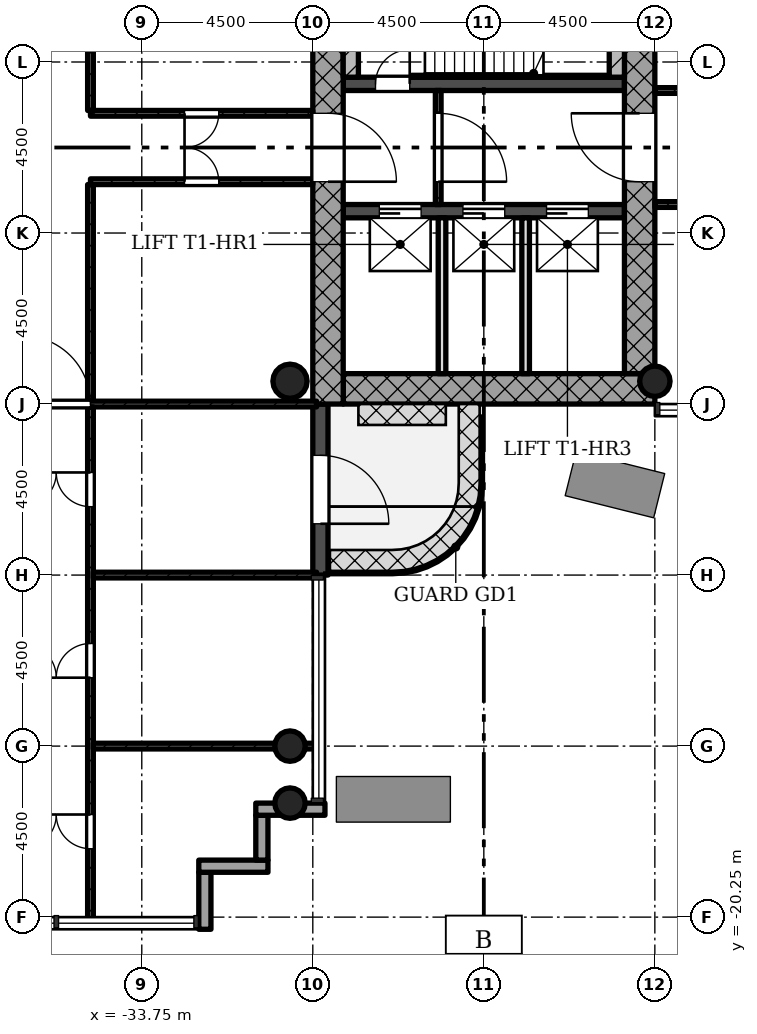
"""IFC4 building model, lengths in metres.
Left out: names, types, materials, properties, quantities, classifications, styles, units other than length and angle.
Written with IfcOpenShell. Run it as: python <this file> out.ifc"""

import sys

from ifc_helpers import new_model, si_unit, direction, frame, frame_2d, origin, origin_2d, place, context, subcontext, project, spatial, rectangle, hollow_circle, extrude, element, fill, save


model = new_model("IFC4")
c1 = context("Model", 3, precision=1e-05, world=origin(), true_north=direction((0.0, 1.0)))
c2 = subcontext(c1, "Body", "Model", "MODEL_VIEW")
j1 = project(units=[si_unit("LENGTHUNIT", "METRE"), si_unit("PLANEANGLEUNIT", "RADIAN")], contexts=[c1])
p1 = place(None, origin())
s1 = spatial("IfcSite", under=j1, at=p1, CompositionType="ELEMENT")
p2 = place(p1, origin())
s2 = spatial("IfcBuilding", under=s1, at=p2, CompositionType="ELEMENT")
p3 = place(p2, frame((0.0, 0.0, 181.3)))
s3 = spatial("IfcBuildingStorey", under=s2, at=p3, CompositionType="ELEMENT", Elevation=181.3)
p4 = place(p3, frame((-28.45, -6.35, 0.0), z_axis=(0.0, 0.0, 1.0), x_axis=(1.0, 0.0, 0.0)))
e1 = element("IfcWall", 1, at=p4, inside=s3, PredefinedType="SHEAR", context=c2, shape_type="SweptSolid", body=[
    extrude(rectangle(XDim=8.2, YDim=0.8, at=frame_2d((4.1, 0.0))), origin(), (0.0, 0.0, 1.0), 4.5),
])
p5 = place(p3, frame((-20.65, -5.95, 0.0), z_axis=(0.0, 0.0, 1.0), x_axis=(0.0, 1.0, 0.0)))
e2 = element("IfcWall", 2, at=p5, inside=s3, PredefinedType="SHEAR", context=c2, shape_type="SweptSolid", body=[
    extrude(rectangle(XDim=12.7, YDim=0.8, at=frame_2d((6.35, 0.0))), origin(), (0.0, 0.0, 1.0), 4.5),
])
p6 = place(p5, frame((5.05, 0.0, 0.0)))
e3 = element("IfcOpeningElement", 3, at=p6, cuts=e2, PredefinedType="OPENING", context=c2, shape_type="SweptSolid", body=[
    extrude(rectangle(XDim=1.8, YDim=2.1, at=frame_2d((0.9, 1.05))), frame((0.0, 0.41, 0.0), z_axis=(0.0, -1.0, 0.0), x_axis=(1.0, 0.0, 0.0)), (0.0, 0.0, 1.0), 0.82),
])
p7 = place(p3, frame((-28.85, 5.95, 0.0), z_axis=(0.0, 0.0, 1.0), x_axis=(0.0, -1.0, 0.0)))
e4 = element("IfcWall", 4, at=p7, inside=s3, PredefinedType="SHEAR", context=c2, shape_type="SweptSolid", body=[
    extrude(rectangle(XDim=12.7, YDim=0.8, at=frame_2d((6.35, 0.0))), origin(), (0.0, 0.0, 1.0), 4.5),
])
p8 = place(p7, frame((5.05, 0.0, 0.0)))
e5 = element("IfcOpeningElement", 5, at=p8, cuts=e4, PredefinedType="OPENING", context=c2, shape_type="SweptSolid", body=[
    extrude(rectangle(XDim=1.8, YDim=2.1, at=frame_2d((0.9, 1.05))), frame((0.0, 0.41, 0.0), z_axis=(0.0, -1.0, 0.0), x_axis=(1.0, 0.0, 0.0)), (0.0, 0.0, 1.0), 0.82),
])
p9 = place(p3, frame((-28.45, -1.675, 0.0), z_axis=(0.0, 0.0, 1.0), x_axis=(1.0, 0.0, 0.0)))
e6 = element("IfcWall", 6, at=p9, inside=s3, PredefinedType="SHEAR", context=c2, shape_type="SweptSolid", body=[
    extrude(rectangle(XDim=7.4, YDim=0.35, at=frame_2d((3.7, 0.0))), origin(), (0.0, 0.0, 1.0), 4.5),
])
p10 = place(p9, frame((0.95, 0.0, 0.0)))
e7 = element("IfcOpeningElement", 7, at=p10, cuts=e6, PredefinedType="OPENING", context=c2, shape_type="SweptSolid", body=[
    extrude(rectangle(XDim=1.1, YDim=2.1, at=frame_2d((0.55, 1.05))), frame((0.0, 0.185, 0.0), z_axis=(0.0, -1.0, 0.0), x_axis=(1.0, 0.0, 0.0)), (0.0, 0.0, 1.0), 0.37),
])
p11 = place(p9, frame((3.15, 0.0, 0.0)))
e8 = element("IfcOpeningElement", 8, at=p11, cuts=e6, PredefinedType="OPENING", context=c2, shape_type="SweptSolid", body=[
    extrude(rectangle(XDim=1.1, YDim=2.1, at=frame_2d((0.55, 1.05))), frame((0.0, 0.185, 0.0), z_axis=(0.0, -1.0, 0.0), x_axis=(1.0, 0.0, 0.0)), (0.0, 0.0, 1.0), 0.37),
])
p12 = place(p9, frame((5.35, 0.0, 0.0)))
e9 = element("IfcOpeningElement", 9, at=p12, cuts=e6, PredefinedType="OPENING", context=c2, shape_type="SweptSolid", body=[
    extrude(rectangle(XDim=1.1, YDim=2.1, at=frame_2d((0.55, 1.05))), frame((0.0, 0.185, 0.0), z_axis=(0.0, -1.0, 0.0), x_axis=(1.0, 0.0, 0.0)), (0.0, 0.0, 1.0), 0.37),
])
p13 = place(p3, frame((-28.45, 1.675, 0.0), z_axis=(0.0, 0.0, 1.0), x_axis=(1.0, 0.0, 0.0)))
e10 = element("IfcWall", 10, at=p13, inside=s3, PredefinedType="SHEAR", context=c2, shape_type="SweptSolid", body=[
    extrude(rectangle(XDim=7.4, YDim=0.35, at=frame_2d((3.7, 0.0))), origin(), (0.0, 0.0, 1.0), 4.5),
])
p14 = place(p13, frame((0.85, 0.0, 0.0)))
e11 = element("IfcOpeningElement", 11, at=p14, cuts=e10, PredefinedType="OPENING", context=c2, shape_type="SweptSolid", body=[
    extrude(rectangle(XDim=0.9, YDim=2.1, at=frame_2d((0.45, 1.05))), frame((0.0, 0.185, 0.0), z_axis=(0.0, -1.0, 0.0), x_axis=(1.0, 0.0, 0.0)), (0.0, 0.0, 1.0), 0.37),
])
for number, where, z_axis, x_axis in (
    (12, (-20.25, -6.15, 0.0), (0.0, 0.0, 1.0), (1.0, 0.0, 0.0)),
    (13, (-29.85, -15.75, 0.0), (0.0, 0.0, 1.0), (1.0, 0.0, 0.0)),
    (14, (-29.85, -17.25, 0.0), (0.0, 0.0, 1.0), (1.0, 0.0, 0.0)),
):
    element("IfcColumn", number, at=place(p3, frame(where, z_axis=z_axis, x_axis=x_axis)), inside=s3, PredefinedType="COLUMN", context=c2, shape_type="SweptSolid", body=[
        extrude(hollow_circle(Radius=0.4, WallThickness=0.028, at=origin_2d()), origin(), (0.0, 0.0, 1.0), 4.5),
    ])
p15 = place(p3, frame((-29.85, -6.15, 0.0), z_axis=(0.0, 0.0, 1.0), x_axis=(1.0, 0.0, 0.0)))
e15 = element("IfcColumn", 15, at=p15, inside=s3, PredefinedType="COLUMN", context=c2, shape_type="SweptSolid", body=[
    extrude(hollow_circle(Radius=0.45, WallThickness=0.032, at=origin_2d()), origin(), (0.0, 0.0, 1.0), 4.5),
])
p16 = place(p3, frame((-32.09, -20.57, -0.3), z_axis=(0.0, 0.0, 1.0), x_axis=(0.0, 1.0, 0.0)))
e16 = element("IfcWall", 16, at=p16, inside=s3, PredefinedType="STANDARD", context=c2, shape_type="SweptSolid", body=[
    extrude(rectangle(XDim=1.5, YDim=0.32, at=frame_2d((0.75, 0.0))), origin(), (0.0, 0.0, 1.0), 4.5),
])
p17 = place(p3, frame((-32.25, -18.91, -0.3), z_axis=(0.0, 0.0, 1.0), x_axis=(1.0, 0.0, 0.0)))
e17 = element("IfcWall", 17, at=p17, inside=s3, PredefinedType="STANDARD", context=c2, shape_type="SweptSolid", body=[
    extrude(rectangle(XDim=1.82, YDim=0.32, at=frame_2d((0.91, 0.0))), origin(), (0.0, 0.0, 1.0), 4.5),
])
p18 = place(p3, frame((-30.59, -18.75, -0.3), z_axis=(0.0, 0.0, 1.0), x_axis=(0.0, 1.0, 0.0)))
e18 = element("IfcWall", 18, at=p18, inside=s3, PredefinedType="STANDARD", context=c2, shape_type="SweptSolid", body=[
    extrude(rectangle(XDim=1.18, YDim=0.32, at=frame_2d((0.59, 0.0))), origin(), (0.0, 0.0, 1.0), 4.5),
])
p19 = place(p3, frame((-30.75, -17.41, -0.3), z_axis=(0.0, 0.0, 1.0), x_axis=(1.0, 0.0, 0.0)))
e19 = element("IfcWall", 19, at=p19, inside=s3, PredefinedType="STANDARD", context=c2, shape_type="SweptSolid", body=[
    extrude(rectangle(XDim=1.82, YDim=0.32, at=frame_2d((0.91, 0.0))), origin(), (0.0, 0.0, 1.0), 4.5),
])
p20 = place(p3, frame((-29.05, -11.25, -0.02), z_axis=(0.0, 0.0, 1.0), x_axis=(0.0, 1.0, 0.0)))
e20 = element("IfcWall", 20, at=p20, inside=s3, PredefinedType="STANDARD", context=c2, shape_type="SweptSolid", body=[
    extrude(rectangle(XDim=4.5, YDim=0.4, at=frame_2d((2.25, 0.0))), origin(), (0.0, 0.0, 1.0), 4.22),
])
p21 = place(p20, frame((1.35, 0.0, 0.02)))
e21 = element("IfcOpeningElement", 21, at=p21, cuts=e20, PredefinedType="OPENING", context=c2, shape_type="SweptSolid", body=[
    extrude(rectangle(XDim=1.8, YDim=2.1, at=frame_2d((0.9, 1.05))), frame((0.0, 0.21, 0.0), z_axis=(0.0, -1.0, 0.0), x_axis=(1.0, 0.0, 0.0)), (0.0, 0.0, 1.0), 0.42),
])
p22 = place(p3, frame((-25.95, -1.5, 0.0), z_axis=(0.0, 0.0, 1.0), x_axis=(0.0, 1.0, 0.0)))
e22 = element("IfcWall", 22, at=p22, inside=s3, PredefinedType="PARTITIONING", context=c2, shape_type="SweptSolid", body=[
    extrude(rectangle(XDim=3.0, YDim=0.15, at=frame_2d((1.5, 0.0))), origin(), (0.0, 0.0, 1.0), 4.08),
])
p23 = place(p22, frame((0.6, 0.0, 0.0)))
e23 = element("IfcOpeningElement", 23, at=p23, cuts=e22, PredefinedType="OPENING", context=c2, shape_type="SweptSolid", body=[
    extrude(rectangle(XDim=1.8, YDim=2.1, at=frame_2d((0.9, 1.05))), frame((0.0, 0.085, 0.0), z_axis=(0.0, -1.0, 0.0), x_axis=(1.0, 0.0, 0.0)), (0.0, 0.0, 1.0), 0.17),
])
for number, where, z_axis, x_axis in (
    (24, (-25.85, -5.95, 0.0), (0.0, 0.0, 1.0), (0.0, 1.0, 0.0)),
    (25, (-23.65, -5.95, 0.0), (0.0, 0.0, 1.0), (0.0, 1.0, 0.0)),
):
    element("IfcWall", number, at=place(p3, frame(where, z_axis=z_axis, x_axis=x_axis)), inside=s3, PredefinedType="SOLIDWALL", context=c2, shape_type="SweptSolid", body=[
        extrude(rectangle(XDim=4.1, YDim=0.2, at=frame_2d((2.05, 0.0))), origin(), (0.0, 0.0, 1.0), 4.08),
    ])
p24 = place(p3, frame((-35.1, 0.9, 0.0), z_axis=(0.0, 0.0, 1.0), x_axis=(1.0, 0.0, 0.0)))
e26 = element("IfcWall", 26, at=p24, inside=s3, PredefinedType="PARTITIONING", context=c2, shape_type="SweptSolid", body=[
    extrude(rectangle(XDim=5.85, YDim=0.15, at=frame_2d((2.925, 0.0))), origin(), (0.0, 0.0, 1.0), 4.08),
])
p25 = place(p24, frame((2.475, 0.0, 0.0)))
e27 = element("IfcOpeningElement", 27, at=p25, cuts=e26, PredefinedType="OPENING", context=c2, shape_type="SweptSolid", body=[
    extrude(rectangle(XDim=0.9, YDim=2.1, at=frame_2d((0.45, 1.05))), frame((0.0, 0.085, 0.0), z_axis=(0.0, -1.0, 0.0), x_axis=(1.0, 0.0, 0.0)), (0.0, 0.0, 1.0), 0.17),
])
p26 = place(p3, frame((-35.1, 0.975, 0.0), z_axis=(0.0, 0.0, 1.0), x_axis=(0.0, 1.0, 0.0)))
e28 = element("IfcWall", 28, at=p26, inside=s3, PredefinedType="PARTITIONING", context=c2, shape_type="SweptSolid", body=[
    extrude(rectangle(XDim=5.7, YDim=0.15, at=frame_2d((2.85, 0.0))), origin(), (0.0, 0.0, 1.0), 4.08),
])
p27 = place(p3, frame((-35.1, -0.9, 0.0), z_axis=(0.0, 0.0, 1.0), x_axis=(1.0, 0.0, 0.0)))
e29 = element("IfcWall", 29, at=p27, inside=s3, PredefinedType="PARTITIONING", context=c2, shape_type="SweptSolid", body=[
    extrude(rectangle(XDim=5.85, YDim=0.15, at=frame_2d((2.925, 0.0))), origin(), (0.0, 0.0, 1.0), 4.08),
])
p28 = place(p27, frame((2.475, 0.0, 0.0)))
e30 = element("IfcOpeningElement", 30, at=p28, cuts=e29, PredefinedType="OPENING", context=c2, shape_type="SweptSolid", body=[
    extrude(rectangle(XDim=0.9, YDim=2.1, at=frame_2d((0.45, 1.05))), frame((0.0, 0.085, 0.0), z_axis=(0.0, -1.0, 0.0), x_axis=(1.0, 0.0, 0.0)), (0.0, 0.0, 1.0), 0.17),
])
p29 = place(p3, frame((-35.1, -6.675, 0.0), z_axis=(0.0, 0.0, 1.0), x_axis=(0.0, 1.0, 0.0)))
e31 = element("IfcWall", 31, at=p29, inside=s3, PredefinedType="PARTITIONING", context=c2, shape_type="SweptSolid", body=[
    extrude(rectangle(XDim=5.7, YDim=0.15, at=frame_2d((2.85, 0.0))), origin(), (0.0, 0.0, 1.0), 4.08),
])
p30 = place(p3, frame((-20.25, 1.5, 0.0), z_axis=(0.0, 0.0, 1.0), x_axis=(1.0, 0.0, 0.0)))
e32 = element("IfcWall", 32, at=p30, inside=s3, PredefinedType="PARTITIONING", context=c2, shape_type="SweptSolid", body=[
    extrude(rectangle(XDim=9.1, YDim=0.15, at=frame_2d((4.55, 0.0))), origin(), (0.0, 0.0, 1.0), 4.08),
])
p31 = place(p30, frame((1.8, 0.0, 0.0)))
e33 = element("IfcOpeningElement", 33, at=p31, cuts=e32, PredefinedType="OPENING", context=c2, shape_type="SweptSolid", body=[
    extrude(rectangle(XDim=0.9, YDim=2.1, at=frame_2d((0.45, 1.05))), frame((0.0, 0.085, 0.0), z_axis=(0.0, -1.0, 0.0), x_axis=(1.0, 0.0, 0.0)), (0.0, 0.0, 1.0), 0.17),
])
p32 = place(p30, frame((6.3, 0.0, 0.0)))
e34 = element("IfcOpeningElement", 34, at=p32, cuts=e32, PredefinedType="OPENING", context=c2, shape_type="SweptSolid", body=[
    extrude(rectangle(XDim=0.9, YDim=2.1, at=frame_2d((0.45, 1.05))), frame((0.0, 0.085, 0.0), z_axis=(0.0, -1.0, 0.0), x_axis=(1.0, 0.0, 0.0)), (0.0, 0.0, 1.0), 0.17),
])
p33 = place(p3, frame((-20.25, -1.5, 0.0), z_axis=(0.0, 0.0, 1.0), x_axis=(1.0, 0.0, 0.0)))
e35 = element("IfcWall", 35, at=p33, inside=s3, PredefinedType="PARTITIONING", context=c2, shape_type="SweptSolid", body=[
    extrude(rectangle(XDim=9.1, YDim=0.15, at=frame_2d((4.55, 0.0))), origin(), (0.0, 0.0, 1.0), 4.08),
])
p34 = place(p33, frame((1.8, 0.0, 0.0)))
e36 = element("IfcOpeningElement", 36, at=p34, cuts=e35, PredefinedType="OPENING", context=c2, shape_type="SweptSolid", body=[
    extrude(rectangle(XDim=0.9, YDim=2.1, at=frame_2d((0.45, 1.05))), frame((0.0, 0.085, 0.0), z_axis=(0.0, -1.0, 0.0), x_axis=(1.0, 0.0, 0.0)), (0.0, 0.0, 1.0), 0.17),
])
p35 = place(p33, frame((6.3, 0.0, 0.0)))
e37 = element("IfcOpeningElement", 37, at=p35, cuts=e35, PredefinedType="OPENING", context=c2, shape_type="SweptSolid", body=[
    extrude(rectangle(XDim=0.9, YDim=2.1, at=frame_2d((0.45, 1.05))), frame((0.0, 0.085, 0.0), z_axis=(0.0, -1.0, 0.0), x_axis=(1.0, 0.0, 0.0)), (0.0, 0.0, 1.0), 0.17),
])
p36 = place(p3, frame((-42.85, -6.75, 0.0), z_axis=(0.0, 0.0, 1.0), x_axis=(1.0, 0.0, 0.0)))
e38 = element("IfcWall", 38, at=p36, inside=s3, PredefinedType="PARTITIONING", context=c2, shape_type="SweptSolid", body=[
    extrude(rectangle(XDim=13.7, YDim=0.15, at=frame_2d((6.85, 0.0))), origin(), (0.0, 0.0, 1.0), 4.08),
])
p37 = place(p36, frame((5.95, 0.0, 0.0)))
e39 = element("IfcOpeningElement", 39, at=p37, cuts=e38, PredefinedType="OPENING", context=c2, shape_type="SweptSolid", body=[
    extrude(rectangle(XDim=1.8, YDim=2.1, at=frame_2d((0.9, 1.05))), frame((0.0, 0.085, 0.0), z_axis=(0.0, -1.0, 0.0), x_axis=(1.0, 0.0, 0.0)), (0.0, 0.0, 1.0), 0.17),
])
p38 = place(p3, frame((-35.1, -20.35, 0.0), z_axis=(0.0, 0.0, 1.0), x_axis=(0.0, 1.0, 0.0)))
e40 = element("IfcWall", 40, at=p38, inside=s3, PredefinedType="PARTITIONING", context=c2, shape_type="SweptSolid", body=[
    extrude(rectangle(XDim=13.525, YDim=0.15, at=frame_2d((6.763, 0.0))), origin(), (0.0, 0.0, 1.0), 4.08),
])
p39 = place(p38, frame((1.9, 0.0, 0.0)))
e41 = element("IfcOpeningElement", 41, at=p39, cuts=e40, PredefinedType="OPENING", context=c2, shape_type="SweptSolid", body=[
    extrude(rectangle(XDim=0.9, YDim=2.1, at=frame_2d((0.45, 1.05))), frame((0.0, 0.085, 0.0), z_axis=(0.0, -1.0, 0.0), x_axis=(1.0, 0.0, 0.0)), (0.0, 0.0, 1.0), 0.17),
])
p40 = place(p38, frame((6.4, 0.0, 0.0)))
e42 = element("IfcOpeningElement", 42, at=p40, cuts=e40, PredefinedType="OPENING", context=c2, shape_type="SweptSolid", body=[
    extrude(rectangle(XDim=0.9, YDim=2.1, at=frame_2d((0.45, 1.05))), frame((0.0, 0.085, 0.0), z_axis=(0.0, -1.0, 0.0), x_axis=(1.0, 0.0, 0.0)), (0.0, 0.0, 1.0), 0.17),
])
p41 = place(p38, frame((10.9, 0.0, 0.0)))
e43 = element("IfcOpeningElement", 43, at=p41, cuts=e40, PredefinedType="OPENING", context=c2, shape_type="SweptSolid", body=[
    extrude(rectangle(XDim=0.9, YDim=2.1, at=frame_2d((0.45, 1.05))), frame((0.0, 0.085, 0.0), z_axis=(0.0, -1.0, 0.0), x_axis=(1.0, 0.0, 0.0)), (0.0, 0.0, 1.0), 0.17),
])
for number, where, z_axis, x_axis in (
    (44, (-35.025, -15.75, 0.0), (0.0, 0.0, 1.0), (1.0, 0.0, 0.0)),
    (45, (-35.025, -11.25, 0.0), (0.0, 0.0, 1.0), (1.0, 0.0, 0.0)),
):
    element("IfcWall", number, at=place(p3, frame(where, z_axis=z_axis, x_axis=x_axis)), inside=s3, PredefinedType="PARTITIONING", context=c2, shape_type="SweptSolid", body=[
        extrude(rectangle(XDim=5.875, YDim=0.15, at=frame_2d((2.938, 0.0))), origin(), (0.0, 0.0, 1.0), 4.08),
    ])
for number, where, z_axis, x_axis in (
    (46, (-21.25, 1.85, 0.0), (0.0, 0.0, 1.0), (0.0, 1.0, 0.0)),
    (47, (-28.25, 1.85, 0.0), (0.0, 0.0, 1.0), (0.0, 1.0, 0.0)),
):
    element("IfcWall", number, at=place(p3, frame(where, z_axis=z_axis, x_axis=x_axis)), inside=s3, PredefinedType="SHEAR", context=c2, shape_type="SweptSolid", body=[
        extrude(rectangle(XDim=4.1, YDim=0.4, at=frame_2d((2.05, 0.0))), origin(), (0.0, 0.0, 1.0), 4.5),
    ])
p42 = place(p3, frame((-26.65, 1.875, 0.0), z_axis=(0.0, 0.0, 1.0), x_axis=(1.0, 0.0, 0.0)))
e48 = element("IfcWall", 48, at=p42, inside=s3, PredefinedType="SHEAR", context=c2, shape_type="SweptSolid", body=[
    extrude(rectangle(XDim=5.2, YDim=0.05, at=frame_2d((2.6, 0.0))), origin(), (0.0, 0.0, 1.0), 4.5),
])
p43 = place(p21, origin())
e49 = element("IfcDoor", 49, at=p43, inside=s3, OperationType="SINGLE_SWING_LEFT", PredefinedType="DOOR", context=c2, shape_type="SweptSolid", body=[
    extrude(rectangle(XDim=1.8, YDim=2.1, at=frame_2d((0.9, 1.05))), frame((0.0, 0.025, 0.0), z_axis=(0.0, -1.0, 0.0), x_axis=(1.0, 0.0, 0.0)), (0.0, 0.0, 1.0), 0.05),
])
fill(e21, e49)
p44 = place(p23, origin())
e50 = element("IfcDoor", 50, at=p44, inside=s3, OperationType="SINGLE_SWING_LEFT", PredefinedType="DOOR", context=c2, shape_type="SweptSolid", body=[
    extrude(rectangle(XDim=1.8, YDim=2.1, at=frame_2d((0.9, 1.05))), frame((0.0, 0.025, 0.0), z_axis=(0.0, -1.0, 0.0), x_axis=(1.0, 0.0, 0.0)), (0.0, 0.0, 1.0), 0.05),
])
fill(e23, e50)
p45 = place(p25, origin())
e51 = element("IfcDoor", 51, at=p45, inside=s3, OperationType="SINGLE_SWING_LEFT", PredefinedType="DOOR", context=c2, shape_type="SweptSolid", body=[
    extrude(rectangle(XDim=0.9, YDim=2.1, at=frame_2d((0.45, 1.05))), frame((0.0, 0.025, 0.0), z_axis=(0.0, -1.0, 0.0), x_axis=(1.0, 0.0, 0.0)), (0.0, 0.0, 1.0), 0.05),
])
fill(e27, e51)
p46 = place(p28, origin())
e52 = element("IfcDoor", 52, at=p46, inside=s3, OperationType="SINGLE_SWING_RIGHT", PredefinedType="DOOR", context=c2, shape_type="SweptSolid", body=[
    extrude(rectangle(XDim=0.9, YDim=2.1, at=frame_2d((0.45, 1.05))), frame((0.0, 0.025, 0.0), z_axis=(0.0, -1.0, 0.0), x_axis=(1.0, 0.0, 0.0)), (0.0, 0.0, 1.0), 0.05),
])
fill(e30, e52)
p47 = place(p37, origin())
e53 = element("IfcDoor", 53, at=p47, inside=s3, OperationType="SINGLE_SWING_RIGHT", PredefinedType="DOOR", context=c2, shape_type="SweptSolid", body=[
    extrude(rectangle(XDim=1.8, YDim=2.1, at=frame_2d((0.9, 1.05))), frame((0.0, 0.025, 0.0), z_axis=(0.0, -1.0, 0.0), x_axis=(1.0, 0.0, 0.0)), (0.0, 0.0, 1.0), 0.05),
])
fill(e39, e53)
p48 = place(p39, origin())
e54 = element("IfcDoor", 54, at=p48, inside=s3, OperationType="SINGLE_SWING_LEFT", PredefinedType="DOOR", context=c2, shape_type="SweptSolid", body=[
    extrude(rectangle(XDim=0.9, YDim=2.1, at=frame_2d((0.45, 1.05))), frame((0.0, 0.025, 0.0), z_axis=(0.0, -1.0, 0.0), x_axis=(1.0, 0.0, 0.0)), (0.0, 0.0, 1.0), 0.05),
])
fill(e41, e54)
p49 = place(p40, origin())
e55 = element("IfcDoor", 55, at=p49, inside=s3, OperationType="SINGLE_SWING_RIGHT", PredefinedType="DOOR", context=c2, shape_type="SweptSolid", body=[
    extrude(rectangle(XDim=0.9, YDim=2.1, at=frame_2d((0.45, 1.05))), frame((0.0, 0.025, 0.0), z_axis=(0.0, -1.0, 0.0), x_axis=(1.0, 0.0, 0.0)), (0.0, 0.0, 1.0), 0.05),
])
fill(e42, e55)
p50 = place(p41, origin())
e56 = element("IfcDoor", 56, at=p50, inside=s3, OperationType="SINGLE_SWING_LEFT", PredefinedType="DOOR", context=c2, shape_type="SweptSolid", body=[
    extrude(rectangle(XDim=0.9, YDim=2.1, at=frame_2d((0.45, 1.05))), frame((0.0, 0.025, 0.0), z_axis=(0.0, -1.0, 0.0), x_axis=(1.0, 0.0, 0.0)), (0.0, 0.0, 1.0), 0.05),
])
fill(e43, e56)
p51 = place(p14, origin())
e57 = element("IfcDoor", 57, at=p51, inside=s3, OperationType="SINGLE_SWING_LEFT", PredefinedType="DOOR", context=c2, shape_type="SweptSolid", body=[
    extrude(rectangle(XDim=0.9, YDim=2.1, at=frame_2d((0.45, 1.05))), frame((0.0, 0.025, 0.0), z_axis=(0.0, -1.0, 0.0), x_axis=(1.0, 0.0, 0.0)), (0.0, 0.0, 1.0), 0.05),
])
fill(e11, e57)
p52 = place(p10, origin())
e58 = element("IfcDoor", 58, at=p52, inside=s3, OperationType="SLIDING_TO_LEFT", PredefinedType="DOOR", context=c2, shape_type="SweptSolid", body=[
    extrude(rectangle(XDim=1.1, YDim=2.1, at=frame_2d((0.55, 1.05))), frame((0.0, 0.025, 0.0), z_axis=(0.0, -1.0, 0.0), x_axis=(1.0, 0.0, 0.0)), (0.0, 0.0, 1.0), 0.05),
])
fill(e7, e58)
p53 = place(p11, origin())
e59 = element("IfcDoor", 59, at=p53, inside=s3, OperationType="SLIDING_TO_LEFT", PredefinedType="DOOR", context=c2, shape_type="SweptSolid", body=[
    extrude(rectangle(XDim=1.1, YDim=2.1, at=frame_2d((0.55, 1.05))), frame((0.0, 0.025, 0.0), z_axis=(0.0, -1.0, 0.0), x_axis=(1.0, 0.0, 0.0)), (0.0, 0.0, 1.0), 0.05),
])
fill(e8, e59)
p54 = place(p12, origin())
e60 = element("IfcDoor", 60, at=p54, inside=s3, OperationType="SLIDING_TO_LEFT", PredefinedType="DOOR", context=c2, shape_type="SweptSolid", body=[
    extrude(rectangle(XDim=1.1, YDim=2.1, at=frame_2d((0.55, 1.05))), frame((0.0, 0.025, 0.0), z_axis=(0.0, -1.0, 0.0), x_axis=(1.0, 0.0, 0.0)), (0.0, 0.0, 1.0), 0.05),
])
fill(e9, e60)
p55 = place(p8, origin())
e61 = element("IfcDoor", 61, at=p55, inside=s3, OperationType="SINGLE_SWING_LEFT", PredefinedType="DOOR", context=c2, shape_type="SweptSolid", body=[
    extrude(rectangle(XDim=1.8, YDim=2.1, at=frame_2d((0.9, 1.05))), frame((0.0, 0.025, 0.0), z_axis=(0.0, -1.0, 0.0), x_axis=(1.0, 0.0, 0.0)), (0.0, 0.0, 1.0), 0.05),
])
fill(e5, e61)
p56 = place(p6, origin())
e62 = element("IfcDoor", 62, at=p56, inside=s3, OperationType="SINGLE_SWING_LEFT", PredefinedType="DOOR", context=c2, shape_type="SweptSolid", body=[
    extrude(rectangle(XDim=1.8, YDim=2.1, at=frame_2d((0.9, 1.05))), frame((0.0, 0.025, 0.0), z_axis=(0.0, -1.0, 0.0), x_axis=(1.0, 0.0, 0.0)), (0.0, 0.0, 1.0), 0.05),
])
fill(e3, e62)
save(model, sys.argv[1])
